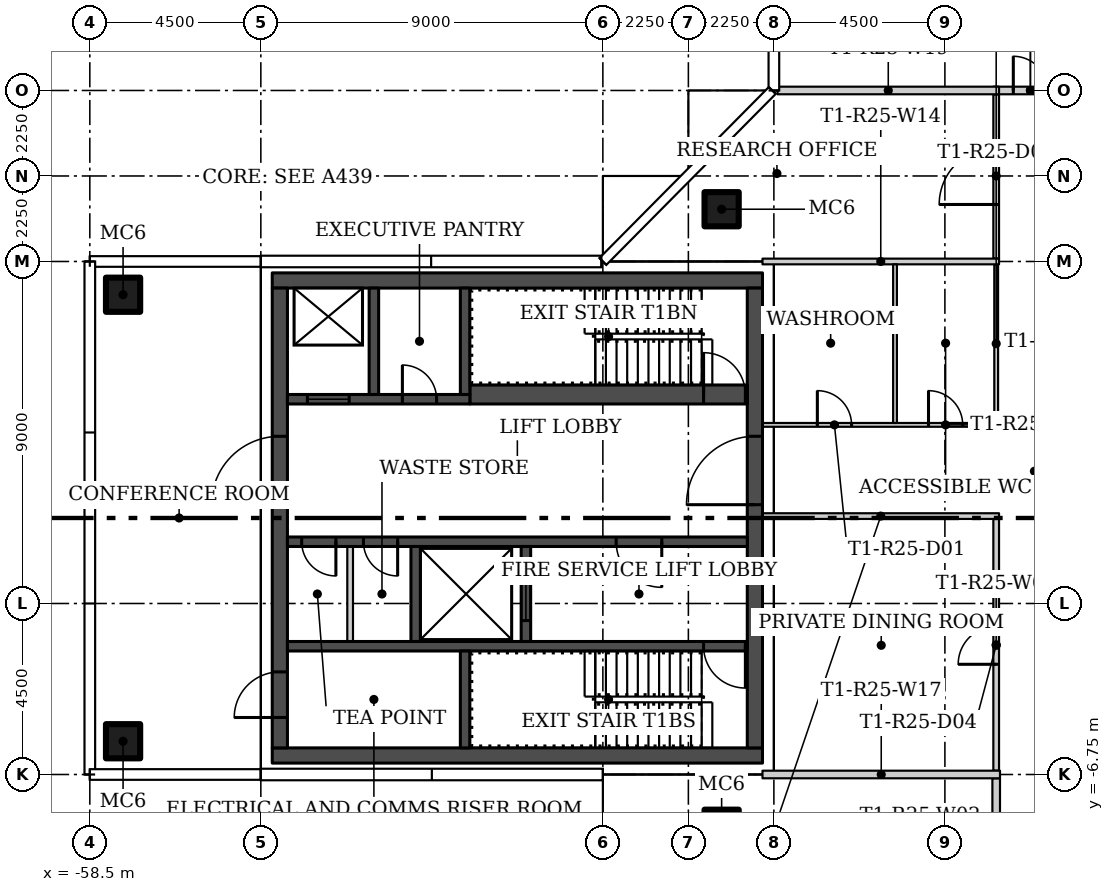
"""IFC4 building model, lengths in metres.
Left out: names, types, materials, properties, quantities, classifications, styles, units other than length and angle.
Written with IfcOpenShell. Run it as: python <this file> out.ifc"""

import sys

from ifc_helpers import new_model, si_unit, direction, frame, frame_2d, origin, origin_2d, place, context, subcontext, project, spatial, rectangle, hollow_rectangle, extrude, element, fill, save


model = new_model("IFC4")
c1 = context("Model", 3, precision=1e-05, world=origin(), true_north=direction((0.0, 1.0)))
c2 = subcontext(c1, "Body", "Model", "MODEL_VIEW")
j1 = project(units=[si_unit("LENGTHUNIT", "METRE"), si_unit("PLANEANGLEUNIT", "RADIAN")], contexts=[c1])
p1 = place(None, origin())
s1 = spatial("IfcSite", under=j1, at=p1, CompositionType="ELEMENT")
p2 = place(p1, origin())
s2 = spatial("IfcBuilding", under=s1, at=p2, CompositionType="ELEMENT")
p3 = place(p2, frame((0.0, 0.0, 230.4)))
s3 = spatial("IfcBuildingStorey", under=s2, at=p3, CompositionType="ELEMENT", Elevation=230.4)
for number, where in (
    (1, (-41.875, 8.125, 0.0)),
    (2, (-41.875, -8.125, 0.0)),
    (3, (-57.625, -5.875, 0.0)),
    (4, (-57.625, 5.875, 0.0)),
):
    element("IfcColumn", number, at=place(p3, frame(where)), inside=s3, PredefinedType="COLUMN", context=c2, shape_type="SweptSolid", body=[
        extrude(hollow_rectangle(XDim=0.9, YDim=0.9, WallThickness=0.036, at=origin_2d()), origin(), (0.0, 0.0, 1.0), 3.55),
    ])
p4 = place(p3, frame((-34.575, 0.05, 0.0), z_axis=(0.0, 0.0, 1.0), x_axis=(-1.0, 0.0, 0.0)))
e5 = element("IfcWall", 5, at=p4, inside=s3, PredefinedType="PARTITIONING", context=c2, shape_type="SweptSolid", body=[
    extrude(rectangle(XDim=6.225, YDim=0.15, at=frame_2d((3.112, 0.0))), origin(), (0.0, 0.0, 1.0), 3.55),
])
p5 = place(p3, frame((-40.8, 2.45, 0.0)))
e6 = element("IfcWall", 6, at=p5, inside=s3, PredefinedType="PARTITIONING", context=c2, shape_type="SweptSolid", body=[
    extrude(rectangle(XDim=6.2, YDim=0.1, at=frame_2d((3.1, 0.0))), origin(), (0.0, 0.0, 1.0), 3.55),
])
p6 = place(p5, frame((1.444, 0.0, 0.0)))
e7 = element("IfcOpeningElement", 7, at=p6, cuts=e6, PredefinedType="OPENING", context=c2, shape_type="SweptSolid", body=[
    extrude(rectangle(XDim=0.9, YDim=2.1, at=frame_2d((0.45, 1.05))), frame((0.0, 0.06, 0.0), z_axis=(0.0, -1.0, 0.0), x_axis=(1.0, 0.0, 0.0)), (0.0, 0.0, 1.0), 0.12),
])
p7 = place(p5, frame((4.368, 0.0, 0.0)))
e8 = element("IfcOpeningElement", 8, at=p7, cuts=e6, PredefinedType="OPENING", context=c2, shape_type="SweptSolid", body=[
    extrude(rectangle(XDim=0.9, YDim=2.1, at=frame_2d((0.45, 1.05))), frame((0.0, 0.06, 0.0), z_axis=(0.0, -1.0, 0.0), x_axis=(1.0, 0.0, 0.0)), (0.0, 0.0, 1.0), 0.12),
])
p8 = place(p3, frame((-34.65, 2.5, 0.0), z_axis=(0.0, 0.0, 1.0), x_axis=(0.0, 1.0, 0.0)))
e9 = element("IfcWall", 9, at=p8, inside=s3, PredefinedType="PARTITIONING", context=c2, shape_type="SweptSolid", body=[
    extrude(rectangle(XDim=4.175, YDim=0.1, at=frame_2d((2.087, 0.0))), origin(), (0.0, 0.0, 1.0), 3.55),
])
p9 = place(p3, frame((-34.65, -6.65, 0.0), z_axis=(0.0, 0.0, 1.0), x_axis=(0.0, 1.0, 0.0)))
e10 = element("IfcWall", 10, at=p9, inside=s3, PredefinedType="PARTITIONING", context=c2, shape_type="SweptSolid", body=[
    extrude(rectangle(XDim=6.625, YDim=0.15, at=frame_2d((3.312, 0.0))), origin(), (0.0, 0.0, 1.0), 3.55),
])
p10 = place(p9, frame((2.8, 0.0, 0.0)))
e11 = element("IfcOpeningElement", 11, at=p10, cuts=e10, PredefinedType="OPENING", context=c2, shape_type="SweptSolid", body=[
    extrude(rectangle(XDim=1.0, YDim=2.4, at=frame_2d((0.5, 1.2))), frame((0.0, 0.085, 0.0), z_axis=(0.0, -1.0, 0.0), x_axis=(1.0, 0.0, 0.0)), (0.0, 0.0, 1.0), 0.17),
])
p11 = place(p3, frame((-34.65, 6.825, 0.0), z_axis=(0.0, 0.0, 1.0), x_axis=(0.0, 1.0, 0.0)))
e12 = element("IfcWall", 12, at=p11, inside=s3, PredefinedType="PARTITIONING", context=c2, shape_type="SweptSolid", body=[
    extrude(rectangle(XDim=4.325, YDim=0.15, at=frame_2d((2.163, 0.0))), origin(), (0.0, 0.0, 1.0), 3.55),
])
p12 = place(p11, frame((1.425, 0.0, 0.0)))
e13 = element("IfcOpeningElement", 13, at=p12, cuts=e12, PredefinedType="OPENING", context=c2, shape_type="SweptSolid", body=[
    extrude(rectangle(XDim=1.5, YDim=2.1, at=frame_2d((0.75, 1.05))), frame((0.0, 0.085, 0.0), z_axis=(0.0, -1.0, 0.0), x_axis=(1.0, 0.0, 0.0)), (0.0, 0.0, 1.0), 0.17),
])
p13 = place(p3, frame((-34.725, 11.25, 0.0)))
e14 = element("IfcWall", 14, at=p13, inside=s3, PredefinedType="PARTITIONING", context=c2, shape_type="SweptSolid", body=[
    extrude(rectangle(XDim=1.951, YDim=0.2, at=frame_2d((0.975, 0.0))), origin(), (0.0, 0.0, 1.0), 3.55),
])
p14 = place(p13, frame((0.525, 0.0, 0.0)))
e15 = element("IfcOpeningElement", 15, at=p14, cuts=e14, PredefinedType="OPENING", context=c2, shape_type="SweptSolid", body=[
    extrude(rectangle(XDim=0.9, YDim=2.4, at=frame_2d((0.45, 1.2))), frame((0.0, 0.11, 0.0), z_axis=(0.0, -1.0, 0.0), x_axis=(1.0, 0.0, 0.0)), (0.0, 0.0, 1.0), 0.22),
])
p15 = place(p3, frame((-34.65, -15.65, 0.0), z_axis=(0.0, 0.0, 1.0), x_axis=(0.0, 1.0, 0.0)))
e16 = element("IfcWall", 16, at=p15, inside=s3, PredefinedType="PARTITIONING", context=c2, shape_type="SweptSolid", body=[
    extrude(rectangle(XDim=8.8, YDim=0.2, at=frame_2d((4.4, 0.0))), origin(), (0.0, 0.0, 1.0), 3.55),
])
p16 = place(p15, frame((3.65, 0.0, 0.0)))
e17 = element("IfcOpeningElement", 17, at=p16, cuts=e16, PredefinedType="OPENING", context=c2, shape_type="SweptSolid", body=[
    extrude(rectangle(XDim=1.5, YDim=2.4, at=frame_2d((0.75, 1.2))), frame((0.0, 0.11, 0.0), z_axis=(0.0, -1.0, 0.0), x_axis=(1.0, 0.0, 0.0)), (0.0, 0.0, 1.0), 0.22),
])
p17 = place(p3, frame((-34.575, 6.75, 0.0), z_axis=(0.0, 0.0, 1.0), x_axis=(-1.0, 0.0, 0.0)))
e18 = element("IfcWall", 18, at=p17, inside=s3, PredefinedType="PARTITIONING", context=c2, shape_type="SweptSolid", body=[
    extrude(rectangle(XDim=6.225, YDim=0.15, at=frame_2d((3.112, 0.0))), origin(), (0.0, 0.0, 1.0), 3.55),
])
p18 = place(p3, frame((-37.312, 2.5, 0.0), z_axis=(0.0, 0.0, 1.0), x_axis=(0.0, 1.0, 0.0)))
e19 = element("IfcWall", 19, at=p18, inside=s3, PredefinedType="PARTITIONING", context=c2, shape_type="SweptSolid", body=[
    extrude(rectangle(XDim=4.175, YDim=0.1, at=frame_2d((2.087, 0.0))), origin(), (0.0, 0.0, 1.0), 3.55),
])
p19 = place(p3, frame((-40.8, -6.75, 0.0)))
e20 = element("IfcWall", 20, at=p19, inside=s3, PredefinedType="PARTITIONING", context=c2, shape_type="SweptSolid", body=[
    extrude(rectangle(XDim=6.25, YDim=0.2, at=frame_2d((3.125, 0.0))), origin(), (0.0, 0.0, 1.0), 3.55),
])
p20 = place(p3, frame((-34.575, 11.25, 0.0), z_axis=(0.0, 0.0, 1.0), x_axis=(-1.0, 0.0, 0.0)))
e21 = element("IfcWall", 21, at=p20, inside=s3, PredefinedType="PARTITIONING", context=c2, shape_type="SweptSolid", body=[
    extrude(rectangle(XDim=5.83, YDim=0.2, at=frame_2d((2.915, 0.0))), origin(), (0.0, 0.0, 1.0), 3.55),
])
for number, where, z_axis, x_axis in (
    (22, (-40.8, -6.25, 0.0), (0.0, 0.0, 1.0), (-1.0, 0.0, 0.0)),
    (23, (-40.8, 6.25, 0.0), (0.0, 0.0, 1.0), (-1.0, 0.0, 0.0)),
):
    element("IfcWall", number, at=place(p3, frame(where, z_axis=z_axis, x_axis=x_axis)), inside=s3, PredefinedType="SHEAR", context=c2, shape_type="SweptSolid", body=[
        extrude(rectangle(XDim=12.9, YDim=0.4, at=frame_2d((6.45, 0.0))), origin(), (0.0, 0.0, 1.0), 3.55),
    ])
p21 = place(p3, frame((-41.0, -6.05, 0.0), z_axis=(0.0, 0.0, 1.0), x_axis=(0.0, 1.0, 0.0)))
e24 = element("IfcWall", 24, at=p21, inside=s3, PredefinedType="SHEAR", context=c2, shape_type="SweptSolid", body=[
    extrude(rectangle(XDim=12.1, YDim=0.4, at=frame_2d((6.05, 0.0))), origin(), (0.0, 0.0, 1.0), 3.55),
])
p22 = place(p21, frame((6.4, 0.0, 0.0)))
e25 = element("IfcOpeningElement", 25, at=p22, cuts=e24, PredefinedType="OPENING", context=c2, shape_type="SweptSolid", body=[
    extrude(rectangle(XDim=1.8, YDim=2.4, at=frame_2d((0.9, 1.2))), frame((0.0, 0.21, 0.0), z_axis=(0.0, -1.0, 0.0), x_axis=(1.0, 0.0, 0.0)), (0.0, 0.0, 1.0), 0.42),
])
p23 = place(p3, frame((-53.5, -6.05, 0.0), z_axis=(0.0, 0.0, 1.0), x_axis=(0.0, 1.0, 0.0)))
e26 = element("IfcWall", 26, at=p23, inside=s3, PredefinedType="SHEAR", context=c2, shape_type="SweptSolid", body=[
    extrude(rectangle(XDim=12.1, YDim=0.4, at=frame_2d((6.05, 0.0))), origin(), (0.0, 0.0, 1.0), 3.55),
])
p24 = place(p23, frame((0.8, 0.0, 0.0)))
e27 = element("IfcOpeningElement", 27, at=p24, cuts=e26, PredefinedType="OPENING", context=c2, shape_type="SweptSolid", body=[
    extrude(rectangle(XDim=1.2, YDim=2.1, at=frame_2d((0.6, 1.05))), frame((0.0, 0.21, 0.0), z_axis=(0.0, -1.0, 0.0), x_axis=(1.0, 0.0, 0.0)), (0.0, 0.0, 1.0), 0.42),
])
p25 = place(p23, frame((6.4, 0.0, 0.0)))
e28 = element("IfcOpeningElement", 28, at=p25, cuts=e26, PredefinedType="OPENING", context=c2, shape_type="SweptSolid", body=[
    extrude(rectangle(XDim=1.8, YDim=2.4, at=frame_2d((0.9, 1.2))), frame((0.0, 0.21, 0.0), z_axis=(0.0, -1.0, 0.0), x_axis=(1.0, 0.0, 0.0)), (0.0, 0.0, 1.0), 0.42),
])
p26 = place(p3, frame((-41.2, -3.375, 0.0), z_axis=(0.0, 0.0, 1.0), x_axis=(-1.0, 0.0, 0.0)))
e29 = element("IfcWall", 29, at=p26, inside=s3, PredefinedType="SHEAR", context=c2, shape_type="SweptSolid", body=[
    extrude(rectangle(XDim=12.1, YDim=0.25, at=frame_2d((6.05, 0.0))), origin(), (0.0, 0.0, 1.0), 3.55),
])
p27 = place(p26, frame((0.05, 0.0, 0.0)))
e30 = element("IfcOpeningElement", 30, at=p27, cuts=e29, PredefinedType="OPENING", context=c2, shape_type="SweptSolid", body=[
    extrude(rectangle(XDim=1.1, YDim=2.1, at=frame_2d((0.55, 1.05))), frame((0.0, 0.135, 0.0), z_axis=(0.0, -1.0, 0.0), x_axis=(1.0, 0.0, 0.0)), (0.0, 0.0, 1.0), 0.27),
])
p28 = place(p3, frame((-48.625, -6.05, 0.0), z_axis=(0.0, 0.0, 1.0), x_axis=(0.0, 1.0, 0.0)))
e31 = element("IfcWall", 31, at=p28, inside=s3, PredefinedType="SHEAR", context=c2, shape_type="SweptSolid", body=[
    extrude(rectangle(XDim=2.55, YDim=0.25, at=frame_2d((1.275, 0.0))), origin(), (0.0, 0.0, 1.0), 3.55),
])
p29 = place(p3, frame((-41.2, -0.625, 0.0), z_axis=(0.0, 0.0, 1.0), x_axis=(-1.0, 0.0, 0.0)))
e32 = element("IfcWall", 32, at=p29, inside=s3, PredefinedType="SHEAR", context=c2, shape_type="SweptSolid", body=[
    extrude(rectangle(XDim=12.1, YDim=0.25, at=frame_2d((6.05, 0.0))), origin(), (0.0, 0.0, 1.0), 3.55),
])
p30 = place(p29, frame((2.25, 0.0, 0.0)))
e33 = element("IfcOpeningElement", 33, at=p30, cuts=e32, PredefinedType="OPENING", context=c2, shape_type="SweptSolid", body=[
    extrude(rectangle(XDim=1.2, YDim=2.1, at=frame_2d((0.6, 1.05))), frame((0.0, 0.135, 0.0), z_axis=(0.0, -1.0, 0.0), x_axis=(1.0, 0.0, 0.0)), (0.0, 0.0, 1.0), 0.27),
])
p31 = place(p29, frame((9.2, 0.0, 0.0)))
e34 = element("IfcOpeningElement", 34, at=p31, cuts=e32, PredefinedType="OPENING", context=c2, shape_type="SweptSolid", body=[
    extrude(rectangle(XDim=0.9, YDim=2.1, at=frame_2d((0.45, 1.05))), frame((0.0, 0.135, 0.0), z_axis=(0.0, -1.0, 0.0), x_axis=(1.0, 0.0, 0.0)), (0.0, 0.0, 1.0), 0.27),
])
p32 = place(p29, frame((10.825, 0.0, 0.0)))
e35 = element("IfcOpeningElement", 35, at=p32, cuts=e32, PredefinedType="OPENING", context=c2, shape_type="SweptSolid", body=[
    extrude(rectangle(XDim=0.9, YDim=2.1, at=frame_2d((0.45, 1.05))), frame((0.0, 0.135, 0.0), z_axis=(0.0, -1.0, 0.0), x_axis=(1.0, 0.0, 0.0)), (0.0, 0.0, 1.0), 0.27),
])
p33 = place(p3, frame((-47.025, -3.25, 0.0), z_axis=(0.0, 0.0, 1.0), x_axis=(0.0, 1.0, 0.0)))
e36 = element("IfcWall", 36, at=p33, inside=s3, PredefinedType="SHEAR", context=c2, shape_type="SweptSolid", body=[
    extrude(rectangle(XDim=2.5, YDim=0.25, at=frame_2d((1.25, 0.0))), origin(), (0.0, 0.0, 1.0), 3.55),
])
p34 = place(p33, frame((0.55, 0.0, 0.0)))
e37 = element("IfcOpeningElement", 37, at=p34, cuts=e36, PredefinedType="OPENING", context=c2, shape_type="SweptSolid", body=[
    extrude(rectangle(XDim=1.4, YDim=2.4, at=frame_2d((0.7, 1.2))), frame((0.0, 0.135, 0.0), z_axis=(0.0, -1.0, 0.0), x_axis=(1.0, 0.0, 0.0)), (0.0, 0.0, 1.0), 0.27),
])
p35 = place(p3, frame((-49.925, -3.25, 0.0), z_axis=(0.0, 0.0, 1.0), x_axis=(0.0, 1.0, 0.0)))
e38 = element("IfcWall", 38, at=p35, inside=s3, PredefinedType="SHEAR", context=c2, shape_type="SweptSolid", body=[
    extrude(rectangle(XDim=2.5, YDim=0.25, at=frame_2d((1.25, 0.0))), origin(), (0.0, 0.0, 1.0), 3.55),
])
p36 = place(p3, frame((-51.65, -3.25, 0.0), z_axis=(0.0, 0.0, 1.0), x_axis=(0.0, 1.0, 0.0)))
e39 = element("IfcWall", 39, at=p36, inside=s3, PredefinedType="PARTITIONING", context=c2, shape_type="SweptSolid", body=[
    extrude(rectangle(XDim=2.5, YDim=0.15, at=frame_2d((1.25, 0.0))), origin(), (0.0, 0.0, 1.0), 3.55),
])
p37 = place(p3, frame((-48.5, 3.25, 0.0)))
e40 = element("IfcWall", 40, at=p37, inside=s3, PredefinedType="SHEAR", context=c2, shape_type="SweptSolid", body=[
    extrude(rectangle(XDim=7.3, YDim=0.5, at=frame_2d((3.65, 0.0))), origin(), (0.0, 0.0, 1.0), 3.55),
])
p38 = place(p37, frame((6.15, 0.0, 0.0)))
e41 = element("IfcOpeningElement", 41, at=p38, cuts=e40, PredefinedType="OPENING", context=c2, shape_type="SweptSolid", body=[
    extrude(rectangle(XDim=1.1, YDim=2.1, at=frame_2d((0.55, 1.05))), frame((0.0, 0.26, 0.0), z_axis=(0.0, -1.0, 0.0), x_axis=(1.0, 0.0, 0.0)), (0.0, 0.0, 1.0), 0.52),
])
p39 = place(p3, frame((-53.3, 3.125, 0.0)))
e42 = element("IfcWall", 42, at=p39, inside=s3, PredefinedType="SHEAR", context=c2, shape_type="SweptSolid", body=[
    extrude(rectangle(XDim=4.8, YDim=0.25, at=frame_2d((2.4, 0.0))), origin(), (0.0, 0.0, 1.0), 3.55),
])
p40 = place(p39, frame((0.525, 0.0, 0.0)))
e43 = element("IfcOpeningElement", 43, at=p40, cuts=e42, PredefinedType="OPENING", context=c2, shape_type="SweptSolid", body=[
    extrude(rectangle(XDim=1.1, YDim=2.1, at=frame_2d((0.55, 1.05))), frame((0.0, 0.135, 0.0), z_axis=(0.0, -1.0, 0.0), x_axis=(1.0, 0.0, 0.0)), (0.0, 0.0, 1.0), 0.27),
])
p41 = place(p39, frame((3.025, 0.0, 0.0)))
e44 = element("IfcOpeningElement", 44, at=p41, cuts=e42, PredefinedType="OPENING", context=c2, shape_type="SweptSolid", body=[
    extrude(rectangle(XDim=0.9, YDim=2.1, at=frame_2d((0.45, 1.05))), frame((0.0, 0.135, 0.0), z_axis=(0.0, -1.0, 0.0), x_axis=(1.0, 0.0, 0.0)), (0.0, 0.0, 1.0), 0.27),
])
for number, where, z_axis, x_axis in (
    (45, (-48.625, 3.25, 0.0), (0.0, 0.0, 1.0), (0.0, 1.0, 0.0)),
    (46, (-51.025, 3.25, 0.0), (0.0, 0.0, 1.0), (0.0, 1.0, 0.0)),
):
    element("IfcWall", number, at=place(p3, frame(where, z_axis=z_axis, x_axis=x_axis)), inside=s3, PredefinedType="SHEAR", context=c2, shape_type="SweptSolid", body=[
        extrude(rectangle(XDim=2.8, YDim=0.25, at=frame_2d((1.4, 0.0))), origin(), (0.0, 0.0, 1.0), 3.55),
    ])
p42 = place(p6, origin())
e47 = element("IfcDoor", 47, at=p42, inside=s3, OperationType="SINGLE_SWING_LEFT", PredefinedType="DOOR", context=c2, shape_type="SweptSolid", body=[
    extrude(rectangle(XDim=0.9, YDim=2.1, at=frame_2d((0.45, 1.05))), frame((0.0, 0.025, 0.0), z_axis=(0.0, -1.0, 0.0), x_axis=(1.0, 0.0, 0.0)), (0.0, 0.0, 1.0), 0.05),
])
fill(e7, e47)
p43 = place(p7, origin())
e48 = element("IfcDoor", 48, at=p43, inside=s3, OperationType="SINGLE_SWING_LEFT", PredefinedType="DOOR", context=c2, shape_type="SweptSolid", body=[
    extrude(rectangle(XDim=0.9, YDim=2.1, at=frame_2d((0.45, 1.05))), frame((0.0, 0.025, 0.0), z_axis=(0.0, -1.0, 0.0), x_axis=(1.0, 0.0, 0.0)), (0.0, 0.0, 1.0), 0.05),
])
fill(e8, e48)
p44 = place(p10, origin())
e49 = element("IfcDoor", 49, at=p44, inside=s3, OperationType="SINGLE_SWING_LEFT", PredefinedType="DOOR", context=c2, shape_type="SweptSolid", body=[
    extrude(rectangle(XDim=1.0, YDim=2.4, at=frame_2d((0.5, 1.2))), frame((0.0, 0.025, 0.0), z_axis=(0.0, -1.0, 0.0), x_axis=(1.0, 0.0, 0.0)), (0.0, 0.0, 1.0), 0.05),
])
fill(e11, e49)
p45 = place(p12, origin())
e50 = element("IfcDoor", 50, at=p45, inside=s3, OperationType="DOUBLE_DOOR_SINGLE_SWING", PredefinedType="DOOR", context=c2, shape_type="SweptSolid", body=[
    extrude(rectangle(XDim=1.5, YDim=2.1, at=frame_2d((0.75, 1.05))), frame((0.0, 0.025, 0.0), z_axis=(0.0, -1.0, 0.0), x_axis=(1.0, 0.0, 0.0)), (0.0, 0.0, 1.0), 0.05),
])
fill(e13, e50)
p46 = place(p14, origin())
e51 = element("IfcDoor", 51, at=p46, inside=s3, OperationType="SINGLE_SWING_LEFT", PredefinedType="DOOR", context=c2, shape_type="SweptSolid", body=[
    extrude(rectangle(XDim=0.9, YDim=2.4, at=frame_2d((0.45, 1.2))), frame((0.0, 0.025, 0.0), z_axis=(0.0, -1.0, 0.0), x_axis=(1.0, 0.0, 0.0)), (0.0, 0.0, 1.0), 0.05),
])
fill(e15, e51)
p47 = place(p22, origin())
e52 = element("IfcDoor", 52, at=p47, inside=s3, OperationType="DOUBLE_DOOR_SINGLE_SWING", PredefinedType="DOOR", context=c2, shape_type="SweptSolid", body=[
    extrude(rectangle(XDim=1.8, YDim=2.4, at=frame_2d((0.9, 1.2))), frame((0.0, 0.025, 0.0), z_axis=(0.0, -1.0, 0.0), x_axis=(1.0, 0.0, 0.0)), (0.0, 0.0, 1.0), 0.05),
])
fill(e25, e52)
p48 = place(p24, origin())
e53 = element("IfcDoor", 53, at=p48, inside=s3, OperationType="SINGLE_SWING_LEFT", PredefinedType="DOOR", context=c2, shape_type="SweptSolid", body=[
    extrude(rectangle(XDim=1.2, YDim=2.1, at=frame_2d((0.6, 1.05))), frame((0.0, 0.025, 0.0), z_axis=(0.0, -1.0, 0.0), x_axis=(1.0, 0.0, 0.0)), (0.0, 0.0, 1.0), 0.05),
])
fill(e27, e53)
p49 = place(p25, origin())
e54 = element("IfcDoor", 54, at=p49, inside=s3, OperationType="DOUBLE_DOOR_SINGLE_SWING", PredefinedType="DOOR", context=c2, shape_type="SweptSolid", body=[
    extrude(rectangle(XDim=1.8, YDim=2.4, at=frame_2d((0.9, 1.2))), frame((0.0, 0.025, 0.0), z_axis=(0.0, -1.0, 0.0), x_axis=(1.0, 0.0, 0.0)), (0.0, 0.0, 1.0), 0.05),
])
fill(e28, e54)
p50 = place(p27, origin())
e55 = element("IfcDoor", 55, at=p50, inside=s3, OperationType="SINGLE_SWING_LEFT", PredefinedType="DOOR", context=c2, shape_type="SweptSolid", body=[
    extrude(rectangle(XDim=1.1, YDim=2.1, at=frame_2d((0.55, 1.05))), frame((0.0, 0.025, 0.0), z_axis=(0.0, -1.0, 0.0), x_axis=(1.0, 0.0, 0.0)), (0.0, 0.0, 1.0), 0.05),
])
fill(e30, e55)
p51 = place(p30, origin())
e56 = element("IfcDoor", 56, at=p51, inside=s3, OperationType="SINGLE_SWING_LEFT", PredefinedType="DOOR", context=c2, shape_type="SweptSolid", body=[
    extrude(rectangle(XDim=1.2, YDim=2.1, at=frame_2d((0.6, 1.05))), frame((0.0, 0.025, 0.0), z_axis=(0.0, -1.0, 0.0), x_axis=(1.0, 0.0, 0.0)), (0.0, 0.0, 1.0), 0.05),
])
fill(e33, e56)
p52 = place(p31, origin())
e57 = element("IfcDoor", 57, at=p52, inside=s3, OperationType="SINGLE_SWING_RIGHT", PredefinedType="DOOR", context=c2, shape_type="SweptSolid", body=[
    extrude(rectangle(XDim=0.9, YDim=2.1, at=frame_2d((0.45, 1.05))), frame((0.0, 0.025, 0.0), z_axis=(0.0, -1.0, 0.0), x_axis=(1.0, 0.0, 0.0)), (0.0, 0.0, 1.0), 0.05),
])
fill(e34, e57)
p53 = place(p32, origin())
e58 = element("IfcDoor", 58, at=p53, inside=s3, OperationType="SINGLE_SWING_RIGHT", PredefinedType="DOOR", context=c2, shape_type="SweptSolid", body=[
    extrude(rectangle(XDim=0.9, YDim=2.1, at=frame_2d((0.45, 1.05))), frame((0.0, 0.025, 0.0), z_axis=(0.0, -1.0, 0.0), x_axis=(1.0, 0.0, 0.0)), (0.0, 0.0, 1.0), 0.05),
])
fill(e35, e58)
p54 = place(p34, origin())
e59 = element("IfcDoor", 59, at=p54, inside=s3, OperationType="SLIDING_TO_LEFT", PredefinedType="DOOR", context=c2, shape_type="SweptSolid", body=[
    extrude(rectangle(XDim=1.4, YDim=2.4, at=frame_2d((0.7, 1.2))), frame((0.0, 0.025, 0.0), z_axis=(0.0, -1.0, 0.0), x_axis=(1.0, 0.0, 0.0)), (0.0, 0.0, 1.0), 0.05),
])
fill(e37, e59)
p55 = place(p38, origin())
e60 = element("IfcDoor", 60, at=p55, inside=s3, OperationType="SINGLE_SWING_RIGHT", PredefinedType="DOOR", context=c2, shape_type="SweptSolid", body=[
    extrude(rectangle(XDim=1.1, YDim=2.1, at=frame_2d((0.55, 1.05))), frame((0.0, 0.025, 0.0), z_axis=(0.0, -1.0, 0.0), x_axis=(1.0, 0.0, 0.0)), (0.0, 0.0, 1.0), 0.05),
])
fill(e41, e60)
p56 = place(p40, origin())
e61 = element("IfcDoor", 61, at=p56, inside=s3, OperationType="SLIDING_TO_LEFT", PredefinedType="DOOR", context=c2, shape_type="SweptSolid", body=[
    extrude(rectangle(XDim=1.1, YDim=2.1, at=frame_2d((0.55, 1.05))), frame((0.0, 0.025, 0.0), z_axis=(0.0, -1.0, 0.0), x_axis=(1.0, 0.0, 0.0)), (0.0, 0.0, 1.0), 0.05),
])
fill(e43, e61)
p57 = place(p41, origin())
e62 = element("IfcDoor", 62, at=p57, inside=s3, OperationType="SINGLE_SWING_RIGHT", PredefinedType="DOOR", context=c2, shape_type="SweptSolid", body=[
    extrude(rectangle(XDim=0.9, YDim=2.1, at=frame_2d((0.45, 1.05))), frame((0.0, 0.025, 0.0), z_axis=(0.0, -1.0, 0.0), x_axis=(1.0, 0.0, 0.0)), (0.0, 0.0, 1.0), 0.05),
])
fill(e44, e62)
save(model, sys.argv[1])
